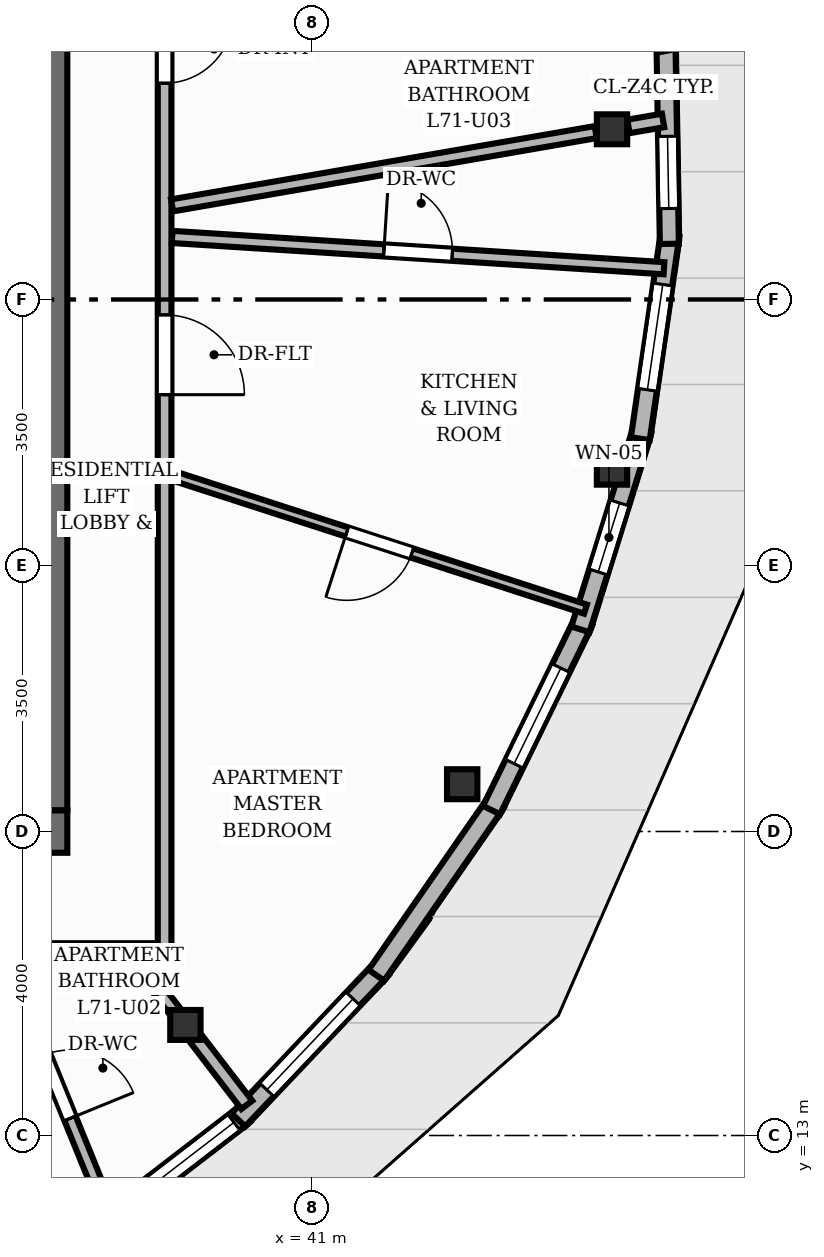
"""IFC4 building model, lengths in metres.
Left out: names, types, materials, properties, quantities, classifications, styles, units other than length and angle.
Written with IfcOpenShell. Run it as: python <this file> out.ifc"""

import sys

from ifc_helpers import new_model, si_unit, direction, frame, frame_2d, origin, origin_2d, place, context, subcontext, project, spatial, rectangle, i_section, extrude, element, fill, save


model = new_model("IFC4")
c1 = context("Model", 3, precision=1e-05, world=origin(), true_north=direction((0.0, 1.0)))
c2 = subcontext(c1, "Body", "Model", "MODEL_VIEW")
j1 = project(units=[si_unit("LENGTHUNIT", "METRE"), si_unit("PLANEANGLEUNIT", "RADIAN")], contexts=[c1])
p1 = place(None, origin())
s1 = spatial("IfcSite", under=j1, at=p1, CompositionType="ELEMENT")
p2 = place(p1, origin())
s2 = spatial("IfcBuilding", under=s1, at=p2, CompositionType="ELEMENT")
p3 = place(p2, frame((0.0, 0.0, 236.64)))
s3 = spatial("IfcBuildingStorey", under=s2, at=p3, CompositionType="ELEMENT", Elevation=236.64)
p4 = place(p3, frame((26.22, 17.0, 0.0), z_axis=(0.0, 0.0, 1.0), x_axis=(1.0, 0.0, 0.0)))
e1 = element("IfcWall", 1, at=p4, inside=s3, PredefinedType="SHEAR", context=c2, shape_type="SweptSolid", body=[
    extrude(rectangle(XDim=11.56, YDim=0.56, at=frame_2d((5.78, 0.0))), origin(), (0.0, 0.0, 1.0), 3.2),
])
p5 = place(p4, frame((2.28, 0.0, 0.0)))
e2 = element("IfcOpeningElement", 2, at=p5, cuts=e1, PredefinedType="OPENING", context=c2, shape_type="SweptSolid", body=[
    extrude(rectangle(XDim=1.1, YDim=2.15, at=frame_2d((0.55, 1.075))), frame((0.0, 0.29, 0.0), z_axis=(0.0, -1.0, 0.0), x_axis=(1.0, 0.0, 0.0)), (0.0, 0.0, 1.0), 0.58),
])
p6 = place(p4, frame((5.83, 0.0, 0.0)))
e3 = element("IfcOpeningElement", 3, at=p6, cuts=e1, PredefinedType="OPENING", context=c2, shape_type="SweptSolid", body=[
    extrude(rectangle(XDim=0.9, YDim=2.1, at=frame_2d((0.45, 1.05))), frame((0.0, 0.29, 0.0), z_axis=(0.0, -1.0, 0.0), x_axis=(1.0, 0.0, 0.0)), (0.0, 0.0, 1.0), 0.58),
])
p7 = place(p3, frame((37.5, 17.28, 0.0), z_axis=(0.0, 0.0, 1.0), x_axis=(0.0, 1.0, 0.0)))
e4 = element("IfcWall", 4, at=p7, inside=s3, PredefinedType="SHEAR", context=c2, shape_type="SweptSolid", body=[
    extrude(rectangle(XDim=13.44, YDim=0.56, at=frame_2d((6.72, 0.0))), origin(), (0.0, 0.0, 1.0), 3.2),
])
for number, where, z_axis, x_axis in (
    (5, (44.946, 26.24, 0.0), (0.0, 0.0, 1.0), (1.0, 0.0, 0.0)),
    (6, (39.333, 14.455, 0.0), (0.0, 0.0, 1.0), (1.0, 0.0, 0.0)),
    (7, (42.975, 17.622, 0.0), (0.0, 0.0, 1.0), (1.0, 0.0, 0.0)),
    (8, (44.946, 21.76, 0.0), (0.0, 0.0, 1.0), (1.0, 0.0, 0.0)),
):
    element("IfcColumn", number, at=place(p3, frame(where, z_axis=z_axis, x_axis=x_axis)), inside=s3, PredefinedType="COLUMN", context=c2, shape_type="SweptSolid", body=[
        extrude(i_section(OverallWidth=0.399, OverallDepth=0.394, WebThickness=0.023, FlangeThickness=0.037, at=origin_2d()), origin(), (0.0, 0.0, 1.0), 3.2),
    ])
p8 = place(p3, frame((40.111, 13.279, 0.0), z_axis=(0.0, 0.0, 1.0), x_axis=(-0.792543354822, -0.609815571076, 0.0)))
e9 = element("IfcWall", 9, at=p8, inside=s3, PredefinedType="SOLIDWALL", context=c2, shape_type="SweptSolid", body=[
    extrude(rectangle(XDim=2.702, YDim=0.25, at=frame_2d((1.351, 0.0))), origin(), (0.0, 0.0, 1.0), 2.96),
])
p9 = place(p8, frame((0.175, 0.0, 0.85)))
e10 = element("IfcOpeningElement", 10, at=p9, cuts=e9, PredefinedType="OPENING", context=c2, shape_type="SweptSolid", body=[
    extrude(rectangle(XDim=1.65, YDim=1.52, at=frame_2d((0.825, 0.76))), frame((0.0, 0.135, 0.0), z_axis=(0.0, -1.0, 0.0), x_axis=(1.0, 0.0, 0.0)), (0.0, 0.0, 1.0), 0.27),
])
p10 = place(p3, frame((41.915, 15.193, 0.0), z_axis=(0.0, 0.0, 1.0), x_axis=(-0.688046261031, -0.725666826223, 0.0)))
e11 = element("IfcWall", 11, at=p10, inside=s3, PredefinedType="SOLIDWALL", context=c2, shape_type="SweptSolid", body=[
    extrude(rectangle(XDim=2.739, YDim=0.25, at=frame_2d((1.369, 0.0))), origin(), (0.0, 0.0, 1.0), 2.96),
])
p11 = place(p10, frame((0.544, 0.0, 0.85)))
e12 = element("IfcOpeningElement", 12, at=p11, cuts=e11, PredefinedType="OPENING", context=c2, shape_type="SweptSolid", body=[
    extrude(rectangle(XDim=1.65, YDim=1.55, at=frame_2d((0.825, 0.775))), frame((0.0, 0.135, 0.0), z_axis=(0.0, -1.0, 0.0), x_axis=(1.0, 0.0, 0.0)), (0.0, 0.0, 1.0), 0.27),
])
p12 = place(p3, frame((43.416, 17.376, 0.0), z_axis=(0.0, 0.0, 1.0), x_axis=(-0.569421689582, -0.822045582333, 0.0)))
e13 = element("IfcWall", 13, at=p12, inside=s3, PredefinedType="SOLIDWALL", context=c2, shape_type="SweptSolid", body=[
    extrude(rectangle(XDim=2.758, YDim=0.25, at=frame_2d((1.379, 0.0))), origin(), (0.0, 0.0, 1.0), 2.96),
])
p13 = place(p3, frame((44.571, 19.761, 0.0), z_axis=(0.0, 0.0, 1.0), x_axis=(-0.438517804861, -0.898722501565, 0.0)))
e14 = element("IfcWall", 14, at=p13, inside=s3, PredefinedType="SOLIDWALL", context=c2, shape_type="SweptSolid", body=[
    extrude(rectangle(XDim=2.758, YDim=0.25, at=frame_2d((1.379, 0.0))), origin(), (0.0, 0.0, 1.0), 2.96),
])
p14 = place(p13, frame((0.679, 0.0, 0.85)))
e15 = element("IfcOpeningElement", 15, at=p14, cuts=e14, PredefinedType="OPENING", context=c2, shape_type="SweptSolid", body=[
    extrude(rectangle(XDim=1.4, YDim=1.55, at=frame_2d((0.7, 0.775))), frame((0.0, 0.135, 0.0), z_axis=(0.0, -1.0, 0.0), x_axis=(1.0, 0.0, 0.0)), (0.0, 0.0, 1.0), 0.27),
])
p15 = place(p3, frame((45.343, 22.275, 0.0), z_axis=(0.0, 0.0, 1.0), x_axis=(-0.29642164717, -0.955057174775, 0.0)))
e16 = element("IfcWall", 16, at=p15, inside=s3, PredefinedType="SOLIDWALL", context=c2, shape_type="SweptSolid", body=[
    extrude(rectangle(XDim=2.739, YDim=0.25, at=frame_2d((1.369, 0.0))), origin(), (0.0, 0.0, 1.0), 2.577),
])
p16 = place(p15, frame((0.997, 0.0, 0.85)))
e17 = element("IfcOpeningElement", 17, at=p16, cuts=e16, PredefinedType="OPENING", context=c2, shape_type="SweptSolid", body=[
    extrude(rectangle(XDim=0.95, YDim=1.45, at=frame_2d((0.475, 0.725))), frame((0.0, 0.135, 0.0), z_axis=(0.0, -1.0, 0.0), x_axis=(1.0, 0.0, 0.0)), (0.0, 0.0, 1.0), 0.27),
])
p17 = place(p3, frame((45.708, 24.842, 0.0), z_axis=(0.0, 0.0, 1.0), x_axis=(-0.144229466115, -0.989544269401, 0.0)))
e18 = element("IfcWall", 18, at=p17, inside=s3, PredefinedType="SOLIDWALL", context=c2, shape_type="SweptSolid", body=[
    extrude(rectangle(XDim=2.702, YDim=0.25, at=frame_2d((1.351, 0.0))), origin(), (0.0, 0.0, 1.0), 2.577),
])
p18 = place(p17, frame((0.651, 0.0, 0.85)))
e19 = element("IfcOpeningElement", 19, at=p18, cuts=e18, PredefinedType="OPENING", context=c2, shape_type="SweptSolid", body=[
    extrude(rectangle(XDim=1.4, YDim=1.55, at=frame_2d((0.7, 0.775))), frame((0.0, 0.135, 0.0), z_axis=(0.0, -1.0, 0.0), x_axis=(1.0, 0.0, 0.0)), (0.0, 0.0, 1.0), 0.27),
])
p19 = place(p3, frame((45.656, 27.383, 0.0), z_axis=(0.0, 0.0, 1.0), x_axis=(0.016945158089, -0.999856420501, 0.0)))
e20 = element("IfcWall", 20, at=p19, inside=s3, PredefinedType="SOLIDWALL", context=c2, shape_type="SweptSolid", body=[
    extrude(rectangle(XDim=2.651, YDim=0.25, at=frame_2d((1.326, 0.0))), origin(), (0.0, 0.0, 1.0), 2.96),
])
p20 = place(p19, frame((1.236, 0.0, 0.85)))
e21 = element("IfcOpeningElement", 21, at=p20, cuts=e20, PredefinedType="OPENING", context=c2, shape_type="SweptSolid", body=[
    extrude(rectangle(XDim=0.95, YDim=1.45, at=frame_2d((0.475, 0.725))), frame((0.0, 0.135, 0.0), z_axis=(0.0, -1.0, 0.0), x_axis=(1.0, 0.0, 0.0)), (0.0, 0.0, 1.0), 0.27),
])
p21 = place(p3, frame((45.188, 29.82, 0.0), z_axis=(0.0, 0.0, 1.0), x_axis=(0.184783228791, -0.982779302976, 0.0)))
e22 = element("IfcWall", 22, at=p21, inside=s3, PredefinedType="SOLIDWALL", context=c2, shape_type="SweptSolid", body=[
    extrude(rectangle(XDim=2.592, YDim=0.25, at=frame_2d((1.296, 0.0))), origin(), (0.0, 0.0, 1.0), 2.96),
])
p22 = place(p21, frame((0.596, 0.0, 0.85)))
e23 = element("IfcOpeningElement", 23, at=p22, cuts=e22, PredefinedType="OPENING", context=c2, shape_type="SweptSolid", body=[
    extrude(rectangle(XDim=1.4, YDim=1.55, at=frame_2d((0.7, 0.775))), frame((0.0, 0.135, 0.0), z_axis=(0.0, -1.0, 0.0), x_axis=(1.0, 0.0, 0.0)), (0.0, 0.0, 1.0), 0.27),
])
p23 = place(p3, frame((45.163, 26.277, 0.0), z_axis=(0.0, 0.0, 1.0), x_axis=(0.985450971837, 0.169959942652, 0.0)))
e24 = element("IfcWall", 24, at=p23, inside=s3, PredefinedType="PARTITIONING", context=c2, shape_type="SweptSolid", body=[
    extrude(rectangle(XDim=0.463, YDim=0.18, at=frame_2d((0.231, 0.0))), origin(), (0.0, 0.0, 1.0), 2.404),
])
p24 = place(p3, frame((39.467, 14.281, 0.0), z_axis=(0.0, 0.0, 1.0), x_axis=(0.609209464238, -0.793009349682, 0.0)))
e25 = element("IfcWall", 25, at=p24, inside=s3, PredefinedType="PARTITIONING", context=c2, shape_type="SweptSolid", body=[
    extrude(rectangle(XDim=1.106, YDim=0.18, at=frame_2d((0.553, 0.0))), origin(), (0.0, 0.0, 1.0), 2.404),
])
p25 = place(p3, frame((39.06, 15.44, 0.0), z_axis=(0.0, 0.0, 1.0), x_axis=(-1.0, 0.0, 0.0)))
e26 = element("IfcWall", 26, at=p25, inside=s3, PredefinedType="PARTITIONING", context=c2, shape_type="SweptSolid", body=[
    extrude(rectangle(XDim=5.672, YDim=0.18, at=frame_2d((2.836, 0.0))), origin(), (0.0, 0.0, 1.0), 2.955),
])
p26 = place(p25, frame((3.373, 0.0, 0.0)))
e27 = element("IfcOpeningElement", 27, at=p26, cuts=e26, PredefinedType="OPENING", context=c2, shape_type="SweptSolid", body=[
    extrude(rectangle(XDim=1.05, YDim=2.15, at=frame_2d((0.525, 1.075))), frame((0.0, 0.1, 0.0), z_axis=(0.0, -1.0, 0.0), x_axis=(1.0, 0.0, 0.0)), (0.0, 0.0, 1.0), 0.2),
])
p27 = place(p3, frame((39.06, 29.391, 0.0), z_axis=(0.0, 0.0, 1.0), x_axis=(0.0, -1.0, 0.0)))
e28 = element("IfcWall", 28, at=p27, inside=s3, PredefinedType="PARTITIONING", context=c2, shape_type="SweptSolid", body=[
    extrude(rectangle(XDim=13.951, YDim=0.18, at=frame_2d((6.975, 0.0))), origin(), (0.0, 0.0, 1.0), 2.955),
])
p28 = place(p27, frame((5.593, 0.0, 0.0)))
e29 = element("IfcOpeningElement", 29, at=p28, cuts=e28, PredefinedType="OPENING", context=c2, shape_type="SweptSolid", body=[
    extrude(rectangle(XDim=1.05, YDim=2.15, at=frame_2d((0.525, 1.075))), frame((0.0, 0.1, 0.0), z_axis=(0.0, -1.0, 0.0), x_axis=(1.0, 0.0, 0.0)), (0.0, 0.0, 1.0), 0.2),
])
p29 = place(p27, frame((1.645, 0.0, 0.0)))
e30 = element("IfcOpeningElement", 30, at=p29, cuts=e28, PredefinedType="OPENING", context=c2, shape_type="SweptSolid", body=[
    extrude(rectangle(XDim=0.9, YDim=2.1, at=frame_2d((0.45, 1.05))), frame((0.0, 0.1, 0.0), z_axis=(0.0, -1.0, 0.0), x_axis=(1.0, 0.0, 0.0)), (0.0, 0.0, 1.0), 0.2),
])
p30 = place(p3, frame((36.951, 15.347, 0.0), z_axis=(0.0, 0.0, 1.0), x_axis=(0.377313729351, -0.92608549802, 0.0)))
e31 = element("IfcWall", 31, at=p30, inside=s3, PredefinedType="PLUMBINGWALL", context=c2, shape_type="SweptSolid", body=[
    extrude(rectangle(XDim=3.684, YDim=0.16, at=frame_2d((1.842, 0.0))), origin(), (0.0, 0.0, 1.0), 2.692),
])
p31 = place(p30, frame((1.392, 0.0, 0.0)))
e32 = element("IfcOpeningElement", 32, at=p31, cuts=e31, PredefinedType="OPENING", context=c2, shape_type="SweptSolid", body=[
    extrude(rectangle(XDim=0.9, YDim=2.1, at=frame_2d((0.45, 1.05))), frame((0.0, 0.09, 0.0), z_axis=(0.0, -1.0, 0.0), x_axis=(1.0, 0.0, 0.0)), (0.0, 0.0, 1.0), 0.18),
])
p32 = place(p3, frame((38.637, 15.361, 0.0), z_axis=(0.0, 0.0, 1.0), x_axis=(0.609314315131, -0.7929287896, 0.0)))
e33 = element("IfcWall", 33, at=p32, inside=s3, PredefinedType="PLUMBINGWALL", context=c2, shape_type="SweptSolid", body=[
    extrude(rectangle(XDim=0.923, YDim=0.16, at=frame_2d((0.461, 0.0))), origin(), (0.0, 0.0, 1.0), 2.404),
])
p33 = place(p3, frame((39.16, 24.823, 0.0), z_axis=(0.0, 0.0, 1.0), x_axis=(0.997982507088, -0.063489491621, 0.0)))
e34 = element("IfcWall", 34, at=p33, inside=s3, PredefinedType="PLUMBINGWALL", context=c2, shape_type="SweptSolid", body=[
    extrude(rectangle(XDim=6.483, YDim=0.16, at=frame_2d((3.242, 0.0))), origin(), (0.0, 0.0, 1.0), 2.692),
])
p34 = place(p33, frame((2.792, 0.0, 0.0)))
e35 = element("IfcOpeningElement", 35, at=p34, cuts=e34, PredefinedType="OPENING", context=c2, shape_type="SweptSolid", body=[
    extrude(rectangle(XDim=0.9, YDim=2.1, at=frame_2d((0.45, 1.05))), frame((0.0, 0.09, 0.0), z_axis=(0.0, -1.0, 0.0), x_axis=(1.0, 0.0, 0.0)), (0.0, 0.0, 1.0), 0.18),
])
p35 = place(p3, frame((44.598, 19.926, 0.0), z_axis=(0.0, 0.0, 1.0), x_axis=(-0.951480669713, 0.307708523058, 0.0)))
e36 = element("IfcWall", 36, at=p35, inside=s3, PredefinedType="PARTITIONING", context=c2, shape_type="SweptSolid", body=[
    extrude(rectangle(XDim=5.7, YDim=0.125, at=frame_2d((2.85, 0.0))), origin(), (0.0, 0.0, 1.0), 2.692),
])
p36 = place(p35, frame((2.4, 0.0, 0.0)))
e37 = element("IfcOpeningElement", 37, at=p36, cuts=e36, PredefinedType="OPENING", context=c2, shape_type="SweptSolid", body=[
    extrude(rectangle(XDim=0.9, YDim=2.1, at=frame_2d((0.45, 1.05))), frame((0.0, 0.073, 0.0), z_axis=(0.0, -1.0, 0.0), x_axis=(1.0, 0.0, 0.0)), (0.0, 0.0, 1.0), 0.145),
])
p37 = place(p3, frame((39.158, 25.238, 0.0), z_axis=(0.0, 0.0, 1.0), x_axis=(0.985360267717, 0.170485022229, 0.0)))
e38 = element("IfcWall", 38, at=p37, inside=s3, PredefinedType="PLUMBINGWALL", context=c2, shape_type="SweptSolid", body=[
    extrude(rectangle(XDim=5.656, YDim=0.16, at=frame_2d((2.828, 0.0))), origin(), (0.0, 0.0, 1.0), 2.404),
])
p38 = place(p9, origin())
e39 = element("IfcWindow", 39, at=p38, inside=s3, PartitioningType="SINGLE_PANEL", PredefinedType="WINDOW", context=c2, shape_type="SweptSolid", body=[
    extrude(rectangle(XDim=1.65, YDim=1.52, at=frame_2d((0.825, 0.76))), frame((0.0, 0.03, 0.0), z_axis=(0.0, -1.0, 0.0), x_axis=(1.0, 0.0, 0.0)), (0.0, 0.0, 1.0), 0.06),
])
fill(e10, e39)
p39 = place(p11, origin())
e40 = element("IfcWindow", 40, at=p39, inside=s3, PartitioningType="SINGLE_PANEL", PredefinedType="WINDOW", context=c2, shape_type="SweptSolid", body=[
    extrude(rectangle(XDim=1.65, YDim=1.55, at=frame_2d((0.825, 0.775))), frame((0.0, 0.03, 0.0), z_axis=(0.0, -1.0, 0.0), x_axis=(1.0, 0.0, 0.0)), (0.0, 0.0, 1.0), 0.06),
])
fill(e12, e40)
p40 = place(p14, origin())
e41 = element("IfcWindow", 41, at=p40, inside=s3, PartitioningType="SINGLE_PANEL", PredefinedType="WINDOW", context=c2, shape_type="SweptSolid", body=[
    extrude(rectangle(XDim=1.4, YDim=1.55, at=frame_2d((0.7, 0.775))), frame((0.0, 0.03, 0.0), z_axis=(0.0, -1.0, 0.0), x_axis=(1.0, 0.0, 0.0)), (0.0, 0.0, 1.0), 0.06),
])
fill(e15, e41)
p41 = place(p16, origin())
e42 = element("IfcWindow", 42, at=p41, inside=s3, PartitioningType="SINGLE_PANEL", PredefinedType="WINDOW", context=c2, shape_type="SweptSolid", body=[
    extrude(rectangle(XDim=0.95, YDim=1.45, at=frame_2d((0.475, 0.725))), frame((0.0, 0.03, 0.0), z_axis=(0.0, -1.0, 0.0), x_axis=(1.0, 0.0, 0.0)), (0.0, 0.0, 1.0), 0.06),
])
fill(e17, e42)
p42 = place(p18, origin())
e43 = element("IfcWindow", 43, at=p42, inside=s3, PartitioningType="SINGLE_PANEL", PredefinedType="WINDOW", context=c2, shape_type="SweptSolid", body=[
    extrude(rectangle(XDim=1.4, YDim=1.55, at=frame_2d((0.7, 0.775))), frame((0.0, 0.03, 0.0), z_axis=(0.0, -1.0, 0.0), x_axis=(1.0, 0.0, 0.0)), (0.0, 0.0, 1.0), 0.06),
])
fill(e19, e43)
p43 = place(p20, origin())
e44 = element("IfcWindow", 44, at=p43, inside=s3, PartitioningType="SINGLE_PANEL", PredefinedType="WINDOW", context=c2, shape_type="SweptSolid", body=[
    extrude(rectangle(XDim=0.95, YDim=1.45, at=frame_2d((0.475, 0.725))), frame((0.0, 0.03, 0.0), z_axis=(0.0, -1.0, 0.0), x_axis=(1.0, 0.0, 0.0)), (0.0, 0.0, 1.0), 0.06),
])
fill(e21, e44)
p44 = place(p31, origin())
e45 = element("IfcDoor", 45, at=p44, inside=s3, OperationType="SINGLE_SWING_RIGHT", PredefinedType="DOOR", context=c2, shape_type="SweptSolid", body=[
    extrude(rectangle(XDim=0.9, YDim=2.1, at=frame_2d((0.45, 1.05))), frame((0.0, 0.025, 0.0), z_axis=(0.0, -1.0, 0.0), x_axis=(1.0, 0.0, 0.0)), (0.0, 0.0, 1.0), 0.05),
])
fill(e32, e45)
p45 = place(p28, origin())
e46 = element("IfcDoor", 46, at=p45, inside=s3, OperationType="SINGLE_SWING_RIGHT", PredefinedType="DOOR", context=c2, shape_type="SweptSolid", body=[
    extrude(rectangle(XDim=1.05, YDim=2.15, at=frame_2d((0.525, 1.075))), frame((0.0, 0.025, 0.0), z_axis=(0.0, -1.0, 0.0), x_axis=(1.0, 0.0, 0.0)), (0.0, 0.0, 1.0), 0.05),
])
fill(e29, e46)
p46 = place(p34, origin())
e47 = element("IfcDoor", 47, at=p46, inside=s3, OperationType="SINGLE_SWING_LEFT", PredefinedType="DOOR", context=c2, shape_type="SweptSolid", body=[
    extrude(rectangle(XDim=0.9, YDim=2.1, at=frame_2d((0.45, 1.05))), frame((0.0, 0.025, 0.0), z_axis=(0.0, -1.0, 0.0), x_axis=(1.0, 0.0, 0.0)), (0.0, 0.0, 1.0), 0.05),
])
fill(e35, e47)
p47 = place(p36, origin())
e48 = element("IfcDoor", 48, at=p47, inside=s3, OperationType="SINGLE_SWING_RIGHT", PredefinedType="DOOR", context=c2, shape_type="SweptSolid", body=[
    extrude(rectangle(XDim=0.9, YDim=2.1, at=frame_2d((0.45, 1.05))), frame((0.0, 0.025, 0.0), z_axis=(0.0, -1.0, 0.0), x_axis=(1.0, 0.0, 0.0)), (0.0, 0.0, 1.0), 0.05),
])
fill(e37, e48)
p48 = place(p29, origin())
e49 = element("IfcDoor", 49, at=p48, inside=s3, OperationType="SINGLE_SWING_LEFT", PredefinedType="DOOR", context=c2, shape_type="SweptSolid", body=[
    extrude(rectangle(XDim=0.9, YDim=2.1, at=frame_2d((0.45, 1.05))), frame((0.0, 0.025, 0.0), z_axis=(0.0, -1.0, 0.0), x_axis=(1.0, 0.0, 0.0)), (0.0, 0.0, 1.0), 0.05),
])
fill(e30, e49)
save(model, sys.argv[1])
